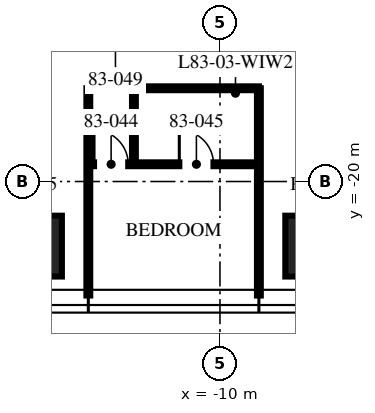
"""IFC4 building model, lengths in metres.
Left out: names, types, materials, properties, quantities, classifications, styles, units other than length and angle.
Written with IfcOpenShell. Run it as: python <this file> out.ifc"""

import sys

from ifc_helpers import new_model, si_unit, direction, frame, frame_2d, origin, origin_2d, place, context, subcontext, project, spatial, rectangle, extrude, element, fill, save


model = new_model("IFC4")
c1 = context("Model", 3, precision=1e-05, world=origin(), true_north=direction((0.0, 1.0)))
c2 = subcontext(c1, "Body", "Model", "MODEL_VIEW")
j1 = project(units=[si_unit("LENGTHUNIT", "METRE"), si_unit("PLANEANGLEUNIT", "RADIAN")], contexts=[c1])
p1 = place(None, origin())
s1 = spatial("IfcSite", under=j1, at=p1, CompositionType="ELEMENT")
p2 = place(p1, origin())
s2 = spatial("IfcBuilding", under=s1, at=p2, CompositionType="ELEMENT")
p3 = place(p2, frame((0.0, 0.0, 330.75)))
s3 = spatial("IfcBuildingStorey", under=s2, at=p3, CompositionType="ELEMENT", Elevation=330.75)
for number, where, z_axis, x_axis in (
    (1, (-7.48, -21.7, 0.0), (0.0, 0.0, 1.0), (1.0, 0.0, 0.0)),
    (2, (-14.96, -21.7, 0.0), (0.0, 0.0, 1.0), (1.0, 0.0, 0.0)),
):
    element("IfcColumn", number, at=place(p3, frame(where, z_axis=z_axis, x_axis=x_axis)), inside=s3, PredefinedType="COLUMN", context=c2, shape_type="SweptSolid", body=[
        extrude(rectangle(XDim=1.6, YDim=1.6, at=origin_2d()), origin(), (0.0, 0.0, 1.0), 3.75),
    ])
for number, where, z_axis, x_axis in (
    (3, (-13.464, -17.546, 0.0), (0.0, 0.0, 1.0), (0.0, -1.0, 0.0)),
    (4, (-8.976, -17.546, 0.0), (0.0, 0.0, 1.0), (0.0, -1.0, 0.0)),
):
    element("IfcWall", number, at=place(p3, frame(where, z_axis=z_axis, x_axis=x_axis)), inside=s3, PredefinedType="PARTITIONING", context=c2, shape_type="SweptSolid", body=[
        extrude(rectangle(XDim=5.454, YDim=0.1, at=frame_2d((2.727, 0.0))), origin(), (0.0, 0.0, 1.0), 3.01),
    ])
p4 = place(p3, frame((-13.464, -19.546, 0.0), z_axis=(0.0, 0.0, 1.0), x_axis=(1.0, 0.0, 0.0)))
e5 = element("IfcWall", 5, at=p4, inside=s3, PredefinedType="PARTITIONING", context=c2, shape_type="SweptSolid", body=[
    extrude(rectangle(XDim=4.488, YDim=0.1, at=frame_2d((2.244, 0.0))), origin(), (0.0, 0.0, 1.0), 2.91),
])
p5 = place(p4, frame((0.15, 0.0, 0.0)))
e6 = element("IfcOpeningElement", 6, at=p5, cuts=e5, PredefinedType="OPENING", context=c2, shape_type="SweptSolid", body=[
    extrude(rectangle(XDim=0.9, YDim=2.1, at=frame_2d((0.45, 1.05))), frame((0.0, 0.06, 0.0), z_axis=(0.0, -1.0, 0.0), x_axis=(1.0, 0.0, 0.0)), (0.0, 0.0, 1.0), 0.12),
])
p6 = place(p4, frame((2.394, 0.0, 0.0)))
e7 = element("IfcOpeningElement", 7, at=p6, cuts=e5, PredefinedType="OPENING", context=c2, shape_type="SweptSolid", body=[
    extrude(rectangle(XDim=0.9, YDim=2.1, at=frame_2d((0.45, 1.05))), frame((0.0, 0.06, 0.0), z_axis=(0.0, -1.0, 0.0), x_axis=(1.0, 0.0, 0.0)), (0.0, 0.0, 1.0), 0.12),
])
p7 = place(p3, frame((-12.264, -17.546, 0.0), z_axis=(0.0, 0.0, 1.0), x_axis=(0.0, -1.0, 0.0)))
e8 = element("IfcWall", 8, at=p7, inside=s3, PredefinedType="PARTITIONING", context=c2, shape_type="SweptSolid", body=[
    extrude(rectangle(XDim=2.0, YDim=0.1, at=frame_2d((1.0, 0.0))), origin(), (0.0, 0.0, 1.0), 3.5),
])
p8 = place(p3, frame((-12.264, -17.546, 0.0), z_axis=(0.0, 0.0, 1.0), x_axis=(1.0, 0.0, 0.0)))
e9 = element("IfcWall", 9, at=p8, inside=s3, PredefinedType="PARTITIONING", context=c2, shape_type="SweptSolid", body=[
    extrude(rectangle(XDim=3.288, YDim=0.1, at=frame_2d((1.644, 0.0))), origin(), (0.0, 0.0, 1.0), 2.91),
])
p9 = place(p5, origin())
e10 = element("IfcDoor", 10, at=p9, inside=s3, OperationType="SINGLE_SWING_LEFT", PredefinedType="DOOR", context=c2, shape_type="SweptSolid", body=[
    extrude(rectangle(XDim=0.9, YDim=2.1, at=frame_2d((0.45, 1.05))), frame((0.0, 0.025, 0.0), z_axis=(0.0, -1.0, 0.0), x_axis=(1.0, 0.0, 0.0)), (0.0, 0.0, 1.0), 0.05),
])
fill(e6, e10)
p10 = place(p6, origin())
e11 = element("IfcDoor", 11, at=p10, inside=s3, OperationType="SINGLE_SWING_LEFT", PredefinedType="DOOR", context=c2, shape_type="SweptSolid", body=[
    extrude(rectangle(XDim=0.9, YDim=2.1, at=frame_2d((0.45, 1.05))), frame((0.0, 0.025, 0.0), z_axis=(0.0, -1.0, 0.0), x_axis=(1.0, 0.0, 0.0)), (0.0, 0.0, 1.0), 0.05),
])
fill(e7, e11)
save(model, sys.argv[1])
